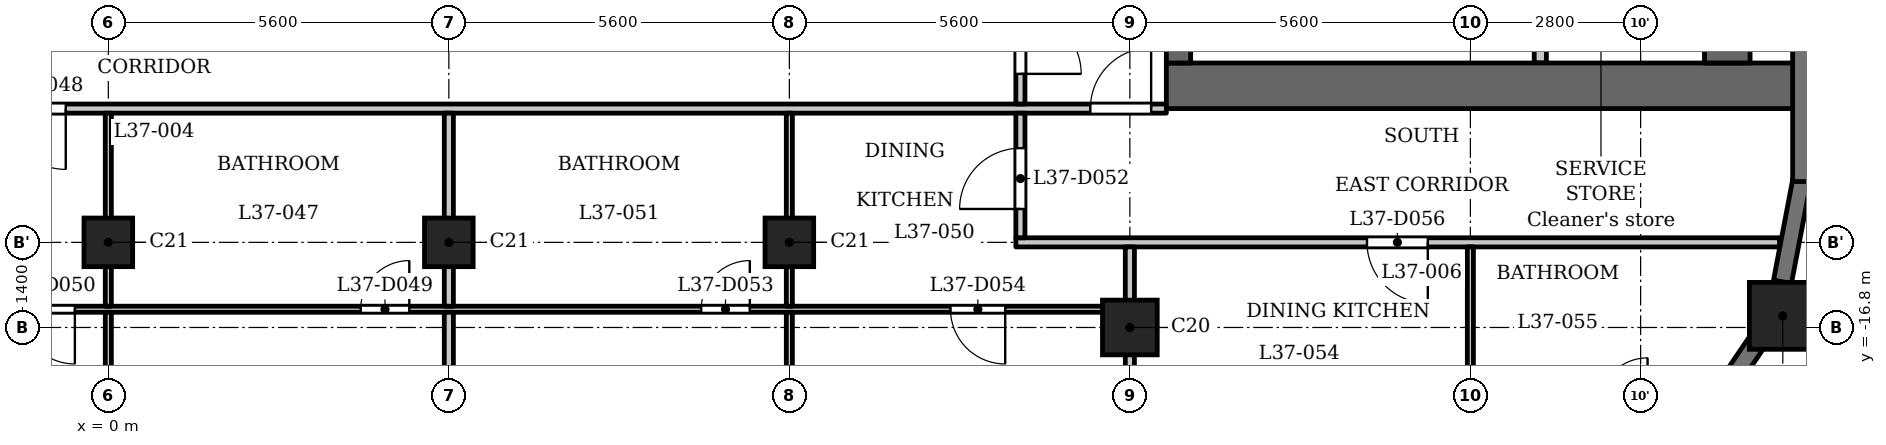
"""IFC4 building model, lengths in metres.
Left out: names, types, materials, properties, quantities, classifications, styles, units other than length and angle.
Written with IfcOpenShell. Run it as: python <this file> out.ifc"""

import sys

from ifc_helpers import new_model, si_unit, direction, frame, frame_2d, origin, origin_2d, place, context, subcontext, project, spatial, rectangle, extrude, element, fill, save


model = new_model("IFC4")
c1 = context("Model", 3, precision=1e-05, world=origin(), true_north=direction((0.0, 1.0)))
c2 = subcontext(c1, "Body", "Model", "MODEL_VIEW")
j1 = project(units=[si_unit("LENGTHUNIT", "METRE"), si_unit("PLANEANGLEUNIT", "RADIAN")], contexts=[c1])
p1 = place(None, origin())
s1 = spatial("IfcSite", under=j1, at=p1, CompositionType="ELEMENT")
p2 = place(p1, origin())
s2 = spatial("IfcBuilding", under=s1, at=p2, CompositionType="ELEMENT")
p3 = place(p2, frame((0.0, 0.0, 146.6)))
s3 = spatial("IfcBuildingStorey", under=s2, at=p3, CompositionType="ELEMENT", Elevation=146.6)
p4 = place(p3, frame((27.538, -16.609, 0.0), z_axis=(0.0, 0.0, 1.0), x_axis=(1.0, 0.0, 0.0)))
e1 = element("IfcColumn", 1, at=p4, inside=s3, PredefinedType="COLUMN", context=c2, shape_type="SweptSolid", body=[
    extrude(rectangle(XDim=1.1, YDim=1.1, at=origin_2d()), origin(), (0.0, 0.0, 1.0), 3.5),
])
p5 = place(p3, frame((16.8, -16.8, 0.0), z_axis=(0.0, 0.0, 1.0), x_axis=(1.0, 0.0, 0.0)))
e2 = element("IfcColumn", 2, at=p5, inside=s3, PredefinedType="COLUMN", context=c2, shape_type="SweptSolid", body=[
    extrude(rectangle(XDim=0.9, YDim=0.9, at=origin_2d()), origin(), (0.0, 0.0, 1.0), 3.5),
])
for number, where, z_axis, x_axis in (
    (3, (0.0, -15.4, 0.0), (0.0, 0.0, 1.0), (1.0, 0.0, 0.0)),
    (4, (5.6, -15.4, 0.0), (0.0, 0.0, 1.0), (1.0, 0.0, 0.0)),
    (5, (11.2, -15.4, 0.0), (0.0, 0.0, 1.0), (1.0, 0.0, 0.0)),
):
    element("IfcColumn", number, at=place(p3, frame(where, z_axis=z_axis, x_axis=x_axis)), inside=s3, PredefinedType="COLUMN", context=c2, shape_type="SweptSolid", body=[
        extrude(rectangle(XDim=0.8, YDim=0.8, at=origin_2d()), origin(), (0.0, 0.0, 1.0), 3.5),
    ])
p6 = place(p3, frame((26.532, -17.893, 0.0), z_axis=(0.0, 0.0, 1.0), x_axis=(0.562105419172, 0.82706559458, 0.0)))
e6 = element("IfcWall", 6, at=p6, inside=s3, PredefinedType="SOLIDWALL", context=c2, shape_type="SweptSolid", body=[
    extrude(rectangle(XDim=1.077, YDim=0.3, at=frame_2d((0.539, 0.0))), origin(), (0.0, 0.0, 1.0), 3.2),
])
p7 = place(p3, frame((27.533, -16.048, 0.0), z_axis=(0.0, 0.0, 1.0), x_axis=(0.187302784601, 0.982302227871, 0.0)))
e7 = element("IfcWall", 7, at=p7, inside=s3, PredefinedType="SOLIDWALL", context=c2, shape_type="SweptSolid", body=[
    extrude(rectangle(XDim=1.706, YDim=0.3, at=frame_2d((0.853, 0.0))), origin(), (0.0, 0.0, 1.0), 2.45),
])
p8 = place(p3, frame((27.85, -14.4, 0.0), z_axis=(0.0, 0.0, 1.0), x_axis=(0.0, 1.0, 0.0)))
e8 = element("IfcWall", 8, at=p8, inside=s3, PredefinedType="SOLIDWALL", context=c2, shape_type="SweptSolid", body=[
    extrude(rectangle(XDim=2.65, YDim=0.3, at=frame_2d((1.325, 0.0))), origin(), (0.0, 0.0, 1.0), 2.45),
])
p9 = place(p3, frame((17.4, -12.825, 0.0), z_axis=(0.0, 0.0, 1.0), x_axis=(1.0, 0.0, 0.0)))
e9 = element("IfcWall", 9, at=p9, inside=s3, PredefinedType="SHEAR", context=c2, shape_type="SweptSolid", body=[
    extrude(rectangle(XDim=10.4, YDim=0.75, at=frame_2d((5.2, 0.0))), origin(), (0.0, 0.0, 1.0), 3.2),
])
p10 = place(p3, frame((17.6, -12.45, 0.0), z_axis=(0.0, 0.0, 1.0), x_axis=(0.0, 1.0, 0.0)))
e10 = element("IfcWall", 10, at=p10, inside=s3, PredefinedType="SHEAR", context=c2, shape_type="SweptSolid", body=[
    extrude(rectangle(XDim=24.9, YDim=0.4, at=frame_2d((12.45, 0.0))), origin(), (0.0, 0.0, 1.0), 3.2),
])
p11 = place(p10, frame((6.325, 0.0, 0.0)))
e11 = element("IfcOpeningElement", 11, at=p11, cuts=e10, PredefinedType="OPENING", context=c2, shape_type="SweptSolid", body=[
    extrude(rectangle(XDim=0.9, YDim=2.1, at=frame_2d((0.45, 1.05))), frame((0.0, 0.21, 0.0), z_axis=(0.0, -1.0, 0.0), x_axis=(1.0, 0.0, 0.0)), (0.0, 0.0, 1.0), 0.42),
])
p12 = place(p10, frame((9.925, 0.0, 0.0)))
e12 = element("IfcOpeningElement", 12, at=p12, cuts=e10, PredefinedType="OPENING", context=c2, shape_type="SweptSolid", body=[
    extrude(rectangle(XDim=0.9, YDim=2.1, at=frame_2d((0.45, 1.05))), frame((0.0, 0.21, 0.0), z_axis=(0.0, -1.0, 0.0), x_axis=(1.0, 0.0, 0.0)), (0.0, 0.0, 1.0), 0.42),
])
p13 = place(p10, frame((15.6, 0.0, 0.0)))
e13 = element("IfcOpeningElement", 13, at=p13, cuts=e10, PredefinedType="OPENING", context=c2, shape_type="SweptSolid", body=[
    extrude(rectangle(XDim=1.1, YDim=2.1, at=frame_2d((0.55, 1.05))), frame((0.0, 0.21, 0.0), z_axis=(0.0, -1.0, 0.0), x_axis=(1.0, 0.0, 0.0)), (0.0, 0.0, 1.0), 0.42),
])
p14 = place(p10, frame((18.0, 0.0, 0.0)))
e14 = element("IfcOpeningElement", 14, at=p14, cuts=e10, PredefinedType="OPENING", context=c2, shape_type="SweptSolid", body=[
    extrude(rectangle(XDim=1.1, YDim=2.1, at=frame_2d((0.55, 1.05))), frame((0.0, 0.21, 0.0), z_axis=(0.0, -1.0, 0.0), x_axis=(1.0, 0.0, 0.0)), (0.0, 0.0, 1.0), 0.42),
])
p15 = place(p10, frame((23.025, 0.0, 0.0)))
e15 = element("IfcOpeningElement", 15, at=p15, cuts=e10, PredefinedType="OPENING", context=c2, shape_type="SweptSolid", body=[
    extrude(rectangle(XDim=1.1, YDim=2.1, at=frame_2d((0.55, 1.05))), frame((0.0, 0.21, 0.0), z_axis=(0.0, -1.0, 0.0), x_axis=(1.0, 0.0, 0.0)), (0.0, 0.0, 1.0), 0.42),
])
p16 = place(p10, frame((0.775, 0.0, 0.0)))
e16 = element("IfcOpeningElement", 16, at=p16, cuts=e10, PredefinedType="OPENING", context=c2, shape_type="SweptSolid", body=[
    extrude(rectangle(XDim=1.1, YDim=2.1, at=frame_2d((0.55, 1.05))), frame((0.0, 0.21, 0.0), z_axis=(0.0, -1.0, 0.0), x_axis=(1.0, 0.0, 0.0)), (0.0, 0.0, 1.0), 0.42),
])
p17 = place(p10, frame((12.925, 0.0, 0.0)))
e17 = element("IfcOpeningElement", 17, at=p17, cuts=e10, PredefinedType="OPENING", context=c2, shape_type="SweptSolid", body=[
    extrude(rectangle(XDim=1.8, YDim=2.1, at=frame_2d((0.9, 1.05))), frame((0.0, 0.21, 0.0), z_axis=(0.0, -1.0, 0.0), x_axis=(1.0, 0.0, 0.0)), (0.0, 0.0, 1.0), 0.42),
])
p18 = place(p3, frame((26.625, -12.45, 0.0), z_axis=(0.0, 0.0, 1.0), x_axis=(0.0, 1.0, 0.0)))
e18 = element("IfcWall", 18, at=p18, inside=s3, PredefinedType="SHEAR", context=c2, shape_type="SweptSolid", body=[
    extrude(rectangle(XDim=24.9, YDim=0.75, at=frame_2d((12.45, 0.0))), origin(), (0.0, 0.0, 1.0), 3.2),
])
p19 = place(p3, frame((23.55, -12.45, 0.0), z_axis=(0.0, 0.0, 1.0), x_axis=(0.0, 1.0, 0.0)))
e19 = element("IfcWall", 19, at=p19, inside=s3, PredefinedType="PARTITIONING", context=c2, shape_type="SweptSolid", body=[
    extrude(rectangle(XDim=2.65, YDim=0.2, at=frame_2d((1.325, 0.0))), origin(), (0.0, 0.0, 1.0), 3.2),
])
p20 = place(p19, frame((0.875, 0.0, 0.0)))
e20 = element("IfcOpeningElement", 20, at=p20, cuts=e19, PredefinedType="OPENING", context=c2, shape_type="SweptSolid", body=[
    extrude(rectangle(XDim=0.9, YDim=2.1, at=frame_2d((0.45, 1.05))), frame((0.0, 0.11, 0.0), z_axis=(0.0, -1.0, 0.0), x_axis=(1.0, 0.0, 0.0)), (0.0, 0.0, 1.0), 0.22),
])
p21 = place(p3, frame((-16.725, -16.5, 0.0), z_axis=(0.0, 0.0, 1.0), x_axis=(1.0, 0.0, 0.0)))
e21 = element("IfcWall", 21, at=p21, inside=s3, PredefinedType="PARTITIONING", context=c2, shape_type="SweptSolid", body=[
    extrude(rectangle(XDim=33.45, YDim=0.1, at=frame_2d((16.725, 0.0))), origin(), (0.0, 0.0, 1.0), 3.2),
])
p22 = place(p21, frame((9.675, 0.0, 0.0)))
e22 = element("IfcOpeningElement", 22, at=p22, cuts=e21, PredefinedType="OPENING", context=c2, shape_type="SweptSolid", body=[
    extrude(rectangle(XDim=0.8, YDim=2.1, at=frame_2d((0.4, 1.05))), frame((0.0, 0.06, 0.0), z_axis=(0.0, -1.0, 0.0), x_axis=(1.0, 0.0, 0.0)), (0.0, 0.0, 1.0), 0.12),
])
p23 = place(p21, frame((4.075, 0.0, 0.0)))
e23 = element("IfcOpeningElement", 23, at=p23, cuts=e21, PredefinedType="OPENING", context=c2, shape_type="SweptSolid", body=[
    extrude(rectangle(XDim=0.9, YDim=2.1, at=frame_2d((0.45, 1.05))), frame((0.0, 0.06, 0.0), z_axis=(0.0, -1.0, 0.0), x_axis=(1.0, 0.0, 0.0)), (0.0, 0.0, 1.0), 0.12),
])
p24 = place(p21, frame((20.875, 0.0, 0.0)))
e24 = element("IfcOpeningElement", 24, at=p24, cuts=e21, PredefinedType="OPENING", context=c2, shape_type="SweptSolid", body=[
    extrude(rectangle(XDim=0.8, YDim=2.1, at=frame_2d((0.4, 1.05))), frame((0.0, 0.06, 0.0), z_axis=(0.0, -1.0, 0.0), x_axis=(1.0, 0.0, 0.0)), (0.0, 0.0, 1.0), 0.12),
])
p25 = place(p21, frame((15.275, 0.0, 0.0)))
e25 = element("IfcOpeningElement", 25, at=p25, cuts=e21, PredefinedType="OPENING", context=c2, shape_type="SweptSolid", body=[
    extrude(rectangle(XDim=0.9, YDim=2.1, at=frame_2d((0.45, 1.05))), frame((0.0, 0.06, 0.0), z_axis=(0.0, -1.0, 0.0), x_axis=(1.0, 0.0, 0.0)), (0.0, 0.0, 1.0), 0.12),
])
p26 = place(p21, frame((26.475, 0.0, 0.0)))
e26 = element("IfcOpeningElement", 26, at=p26, cuts=e21, PredefinedType="OPENING", context=c2, shape_type="SweptSolid", body=[
    extrude(rectangle(XDim=0.8, YDim=2.1, at=frame_2d((0.4, 1.05))), frame((0.0, 0.06, 0.0), z_axis=(0.0, -1.0, 0.0), x_axis=(1.0, 0.0, 0.0)), (0.0, 0.0, 1.0), 0.12),
])
p27 = place(p21, frame((30.575, 0.0, 0.0)))
e27 = element("IfcOpeningElement", 27, at=p27, cuts=e21, PredefinedType="OPENING", context=c2, shape_type="SweptSolid", body=[
    extrude(rectangle(XDim=0.9, YDim=2.1, at=frame_2d((0.45, 1.05))), frame((0.0, 0.06, 0.0), z_axis=(0.0, -1.0, 0.0), x_axis=(1.0, 0.0, 0.0)), (0.0, 0.0, 1.0), 0.12),
])
p28 = place(p3, frame((14.925, -15.4, 0.0), z_axis=(0.0, 0.0, 1.0), x_axis=(1.0, 0.0, 0.0)))
e28 = element("IfcWall", 28, at=p28, inside=s3, PredefinedType="PARTITIONING", context=c2, shape_type="SweptSolid", body=[
    extrude(rectangle(XDim=12.559, YDim=0.15, at=frame_2d((6.279, 0.0))), origin(), (0.0, 0.0, 1.0), 3.2),
])
p29 = place(p28, frame((5.775, 0.0, 0.0)))
e29 = element("IfcOpeningElement", 29, at=p29, cuts=e28, PredefinedType="OPENING", context=c2, shape_type="SweptSolid", body=[
    extrude(rectangle(XDim=1.0, YDim=2.1, at=frame_2d((0.5, 1.05))), frame((0.0, 0.085, 0.0), z_axis=(0.0, -1.0, 0.0), x_axis=(1.0, 0.0, 0.0)), (0.0, 0.0, 1.0), 0.17),
])
p30 = place(p3, frame((-17.4, -13.2, 0.0), z_axis=(0.0, 0.0, 1.0), x_axis=(1.0, 0.0, 0.0)))
e30 = element("IfcWall", 30, at=p30, inside=s3, PredefinedType="PARTITIONING", context=c2, shape_type="SweptSolid", body=[
    extrude(rectangle(XDim=34.8, YDim=0.15, at=frame_2d((17.4, 0.0))), origin(), (0.0, 0.0, 1.0), 3.2),
])
p31 = place(p30, frame((0.15, 0.0, 0.0)))
e31 = element("IfcOpeningElement", 31, at=p31, cuts=e30, PredefinedType="OPENING", context=c2, shape_type="SweptSolid", body=[
    extrude(rectangle(XDim=1.0, YDim=2.1, at=frame_2d((0.5, 1.05))), frame((0.0, 0.085, 0.0), z_axis=(0.0, -1.0, 0.0), x_axis=(1.0, 0.0, 0.0)), (0.0, 0.0, 1.0), 0.17),
])
p32 = place(p30, frame((33.55, 0.0, 0.0)))
e32 = element("IfcOpeningElement", 32, at=p32, cuts=e30, PredefinedType="OPENING", context=c2, shape_type="SweptSolid", body=[
    extrude(rectangle(XDim=1.0, YDim=2.1, at=frame_2d((0.5, 1.05))), frame((0.0, 0.085, 0.0), z_axis=(0.0, -1.0, 0.0), x_axis=(1.0, 0.0, 0.0)), (0.0, 0.0, 1.0), 0.17),
])
p33 = place(p30, frame((15.7, 0.0, 0.0)))
e33 = element("IfcOpeningElement", 33, at=p33, cuts=e30, PredefinedType="OPENING", context=c2, shape_type="SweptSolid", body=[
    extrude(rectangle(XDim=1.0, YDim=2.1, at=frame_2d((0.5, 1.05))), frame((0.0, 0.085, 0.0), z_axis=(0.0, -1.0, 0.0), x_axis=(1.0, 0.0, 0.0)), (0.0, 0.0, 1.0), 0.17),
])
p34 = place(p3, frame((0.0, -22.93, 0.0), z_axis=(0.0, 0.0, 1.0), x_axis=(0.0, 1.0, 0.0)))
e34 = element("IfcWall", 34, at=p34, inside=s3, PredefinedType="PARTITIONING", context=c2, shape_type="SweptSolid", body=[
    extrude(rectangle(XDim=6.38, YDim=0.1, at=frame_2d((3.19, 0.0))), origin(), (0.0, 0.0, 1.0), 3.2),
])
p35 = place(p34, frame((1.27, 0.0, 0.0)))
e35 = element("IfcOpeningElement", 35, at=p35, cuts=e34, PredefinedType="OPENING", context=c2, shape_type="SweptSolid", body=[
    extrude(rectangle(XDim=0.9, YDim=2.1, at=frame_2d((0.45, 1.05))), frame((0.0, 0.06, 0.0), z_axis=(0.0, -1.0, 0.0), x_axis=(1.0, 0.0, 0.0)), (0.0, 0.0, 1.0), 0.12),
])
p36 = place(p3, frame((0.0, -16.45, 0.0), z_axis=(0.0, 0.0, 1.0), x_axis=(0.0, 1.0, 0.0)))
e36 = element("IfcWall", 36, at=p36, inside=s3, PredefinedType="PARTITIONING", context=c2, shape_type="SweptSolid", body=[
    extrude(rectangle(XDim=3.175, YDim=0.1, at=frame_2d((1.587, 0.0))), origin(), (0.0, 0.0, 1.0), 3.2),
])
p37 = place(p3, frame((5.6, -22.93, 0.0), z_axis=(0.0, 0.0, 1.0), x_axis=(0.0, 1.0, 0.0)))
e37 = element("IfcWall", 37, at=p37, inside=s3, PredefinedType="PARTITIONING", context=c2, shape_type="SweptSolid", body=[
    extrude(rectangle(XDim=6.38, YDim=0.15, at=frame_2d((3.19, 0.0))), origin(), (0.0, 0.0, 1.0), 3.2),
])
p38 = place(p3, frame((5.6, -16.45, 0.0), z_axis=(0.0, 0.0, 1.0), x_axis=(0.0, 1.0, 0.0)))
e38 = element("IfcWall", 38, at=p38, inside=s3, PredefinedType="PARTITIONING", context=c2, shape_type="SweptSolid", body=[
    extrude(rectangle(XDim=3.175, YDim=0.15, at=frame_2d((1.587, 0.0))), origin(), (0.0, 0.0, 1.0), 3.2),
])
p39 = place(p3, frame((11.2, -22.93, 0.0), z_axis=(0.0, 0.0, 1.0), x_axis=(0.0, 1.0, 0.0)))
e39 = element("IfcWall", 39, at=p39, inside=s3, PredefinedType="PARTITIONING", context=c2, shape_type="SweptSolid", body=[
    extrude(rectangle(XDim=6.38, YDim=0.1, at=frame_2d((3.19, 0.0))), origin(), (0.0, 0.0, 1.0), 3.2),
])
p40 = place(p39, frame((4.13, 0.0, 0.0)))
e40 = element("IfcOpeningElement", 40, at=p40, cuts=e39, PredefinedType="OPENING", context=c2, shape_type="SweptSolid", body=[
    extrude(rectangle(XDim=0.9, YDim=2.1, at=frame_2d((0.45, 1.05))), frame((0.0, 0.06, 0.0), z_axis=(0.0, -1.0, 0.0), x_axis=(1.0, 0.0, 0.0)), (0.0, 0.0, 1.0), 0.12),
])
p41 = place(p3, frame((11.2, -16.45, 0.0), z_axis=(0.0, 0.0, 1.0), x_axis=(0.0, 1.0, 0.0)))
e41 = element("IfcWall", 41, at=p41, inside=s3, PredefinedType="PARTITIONING", context=c2, shape_type="SweptSolid", body=[
    extrude(rectangle(XDim=3.175, YDim=0.1, at=frame_2d((1.587, 0.0))), origin(), (0.0, 0.0, 1.0), 3.2),
])
p42 = place(p3, frame((15.0, -15.325, 0.0), z_axis=(0.0, 0.0, 1.0), x_axis=(0.0, 1.0, 0.0)))
e42 = element("IfcWall", 42, at=p42, inside=s3, PredefinedType="PARTITIONING", context=c2, shape_type="SweptSolid", body=[
    extrude(rectangle(XDim=2.05, YDim=0.15, at=frame_2d((1.025, 0.0))), origin(), (0.0, 0.0, 1.0), 3.2),
])
p43 = place(p42, frame((0.474, 0.0, 0.0)))
e43 = element("IfcOpeningElement", 43, at=p43, cuts=e42, PredefinedType="OPENING", context=c2, shape_type="SweptSolid", body=[
    extrude(rectangle(XDim=1.0, YDim=2.1, at=frame_2d((0.5, 1.05))), frame((0.0, 0.085, 0.0), z_axis=(0.0, -1.0, 0.0), x_axis=(1.0, 0.0, 0.0)), (0.0, 0.0, 1.0), 0.17),
])
p44 = place(p3, frame((15.0, -13.125, 0.0), z_axis=(0.0, 0.0, 1.0), x_axis=(0.0, 1.0, 0.0)))
e44 = element("IfcWall", 44, at=p44, inside=s3, PredefinedType="PARTITIONING", context=c2, shape_type="SweptSolid", body=[
    extrude(rectangle(XDim=6.356, YDim=0.15, at=frame_2d((3.178, 0.0))), origin(), (0.0, 0.0, 1.0), 3.2),
])
p45 = place(p44, frame((0.496, 0.0, 0.0)))
e45 = element("IfcOpeningElement", 45, at=p45, cuts=e44, PredefinedType="OPENING", context=c2, shape_type="SweptSolid", body=[
    extrude(rectangle(XDim=1.0, YDim=2.1, at=frame_2d((0.5, 1.05))), frame((0.0, 0.085, 0.0), z_axis=(0.0, -1.0, 0.0), x_axis=(1.0, 0.0, 0.0)), (0.0, 0.0, 1.0), 0.17),
])
p46 = place(p3, frame((16.8, -22.93, 0.0), z_axis=(0.0, 0.0, 1.0), x_axis=(0.0, 1.0, 0.0)))
e46 = element("IfcWall", 46, at=p46, inside=s3, PredefinedType="PARTITIONING", context=c2, shape_type="SweptSolid", body=[
    extrude(rectangle(XDim=7.455, YDim=0.15, at=frame_2d((3.728, 0.0))), origin(), (0.0, 0.0, 1.0), 3.2),
])
p47 = place(p3, frame((22.4, -18.05, 0.0), z_axis=(0.0, 0.0, 1.0), x_axis=(0.0, 1.0, 0.0)))
e47 = element("IfcWall", 47, at=p47, inside=s3, PredefinedType="PARTITIONING", context=c2, shape_type="SweptSolid", body=[
    extrude(rectangle(XDim=2.575, YDim=0.1, at=frame_2d((1.288, 0.0))), origin(), (0.0, 0.0, 1.0), 3.2),
])
p48 = place(p45, origin())
e48 = element("IfcDoor", 48, at=p48, inside=s3, OperationType="SINGLE_SWING_LEFT", PredefinedType="DOOR", context=c2, shape_type="SweptSolid", body=[
    extrude(rectangle(XDim=1.0, YDim=2.1, at=frame_2d((0.5, 1.05))), frame((0.0, 0.025, 0.0), z_axis=(0.0, -1.0, 0.0), x_axis=(1.0, 0.0, 0.0)), (0.0, 0.0, 1.0), 0.05),
])
fill(e45, e48)
p49 = place(p32, origin())
e49 = element("IfcDoor", 49, at=p49, inside=s3, OperationType="SINGLE_SWING_LEFT", PredefinedType="DOOR", context=c2, shape_type="SweptSolid", body=[
    extrude(rectangle(XDim=1.0, YDim=2.1, at=frame_2d((0.5, 1.05))), frame((0.0, 0.025, 0.0), z_axis=(0.0, -1.0, 0.0), x_axis=(1.0, 0.0, 0.0)), (0.0, 0.0, 1.0), 0.05),
])
fill(e32, e49)
p50 = place(p33, origin())
e50 = element("IfcDoor", 50, at=p50, inside=s3, OperationType="SINGLE_SWING_RIGHT", PredefinedType="DOOR", context=c2, shape_type="SweptSolid", body=[
    extrude(rectangle(XDim=1.0, YDim=2.1, at=frame_2d((0.5, 1.05))), frame((0.0, 0.025, 0.0), z_axis=(0.0, -1.0, 0.0), x_axis=(1.0, 0.0, 0.0)), (0.0, 0.0, 1.0), 0.05),
])
fill(e33, e50)
p51 = place(p24, origin())
e51 = element("IfcDoor", 51, at=p51, inside=s3, OperationType="SINGLE_SWING_LEFT", PredefinedType="DOOR", context=c2, shape_type="SweptSolid", body=[
    extrude(rectangle(XDim=0.8, YDim=2.1, at=frame_2d((0.4, 1.05))), frame((0.0, 0.025, 0.0), z_axis=(0.0, -1.0, 0.0), x_axis=(1.0, 0.0, 0.0)), (0.0, 0.0, 1.0), 0.05),
])
fill(e24, e51)
p52 = place(p25, origin())
e52 = element("IfcDoor", 52, at=p52, inside=s3, OperationType="SINGLE_SWING_RIGHT", PredefinedType="DOOR", context=c2, shape_type="SweptSolid", body=[
    extrude(rectangle(XDim=0.9, YDim=2.1, at=frame_2d((0.45, 1.05))), frame((0.0, 0.025, 0.0), z_axis=(0.0, -1.0, 0.0), x_axis=(1.0, 0.0, 0.0)), (0.0, 0.0, 1.0), 0.05),
])
fill(e25, e52)
p53 = place(p43, origin())
e53 = element("IfcDoor", 53, at=p53, inside=s3, OperationType="SINGLE_SWING_RIGHT", PredefinedType="DOOR", context=c2, shape_type="SweptSolid", body=[
    extrude(rectangle(XDim=1.0, YDim=2.1, at=frame_2d((0.5, 1.05))), frame((0.0, 0.025, 0.0), z_axis=(0.0, -1.0, 0.0), x_axis=(1.0, 0.0, 0.0)), (0.0, 0.0, 1.0), 0.05),
])
fill(e43, e53)
p54 = place(p26, origin())
e54 = element("IfcDoor", 54, at=p54, inside=s3, OperationType="SINGLE_SWING_LEFT", PredefinedType="DOOR", context=c2, shape_type="SweptSolid", body=[
    extrude(rectangle(XDim=0.8, YDim=2.1, at=frame_2d((0.4, 1.05))), frame((0.0, 0.025, 0.0), z_axis=(0.0, -1.0, 0.0), x_axis=(1.0, 0.0, 0.0)), (0.0, 0.0, 1.0), 0.05),
])
fill(e26, e54)
p55 = place(p27, origin())
e55 = element("IfcDoor", 55, at=p55, inside=s3, OperationType="SINGLE_SWING_RIGHT", PredefinedType="DOOR", context=c2, shape_type="SweptSolid", body=[
    extrude(rectangle(XDim=0.9, YDim=2.1, at=frame_2d((0.45, 1.05))), frame((0.0, 0.025, 0.0), z_axis=(0.0, -1.0, 0.0), x_axis=(1.0, 0.0, 0.0)), (0.0, 0.0, 1.0), 0.05),
])
fill(e27, e55)
p56 = place(p29, origin())
e56 = element("IfcDoor", 56, at=p56, inside=s3, OperationType="SINGLE_SWING_RIGHT", PredefinedType="DOOR", context=c2, shape_type="SweptSolid", body=[
    extrude(rectangle(XDim=1.0, YDim=2.1, at=frame_2d((0.5, 1.05))), frame((0.0, 0.025, 0.0), z_axis=(0.0, -1.0, 0.0), x_axis=(1.0, 0.0, 0.0)), (0.0, 0.0, 1.0), 0.05),
])
fill(e29, e56)
save(model, sys.argv[1])
